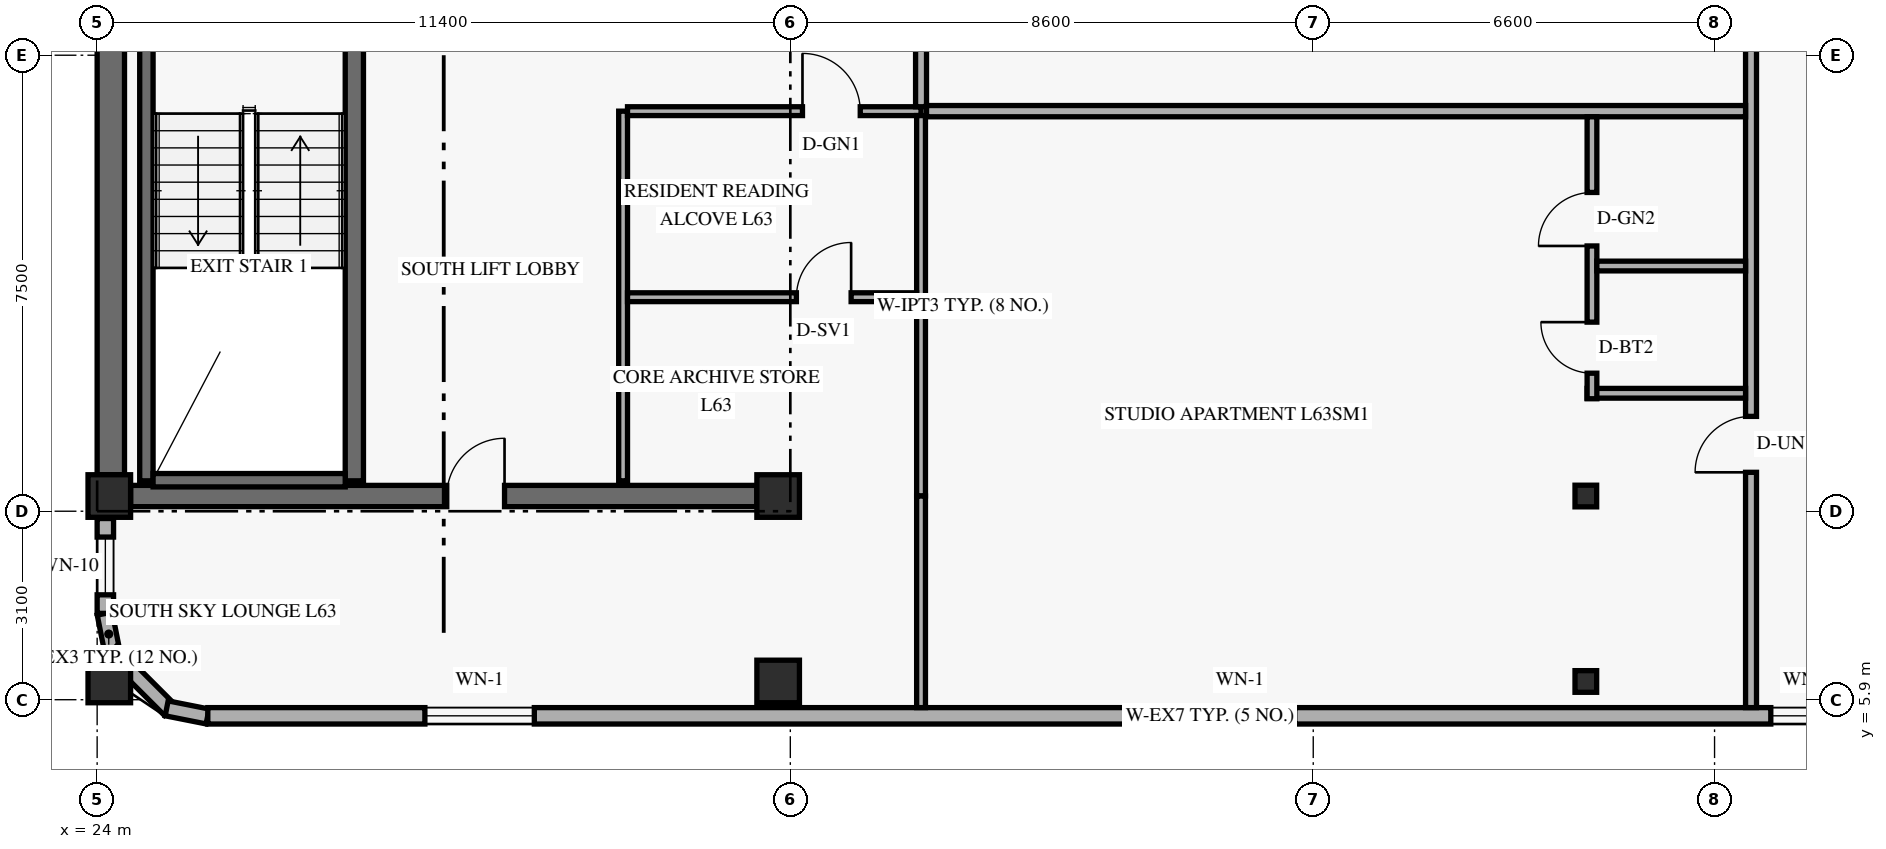
"""IFC4 building model, lengths in metres.
Left out: names, types, materials, properties, quantities, classifications, styles, units other than length and angle.
Written with IfcOpenShell. Run it as: python <this file> out.ifc"""

import sys

from ifc_helpers import new_model, si_unit, direction, frame, frame_2d, origin, origin_2d, place, context, subcontext, project, spatial, rectangle, hollow_rectangle, extrude, element, fill, save


model = new_model("IFC4")
c1 = context("Model", 3, precision=1e-05, world=origin(), true_north=direction((0.0, 1.0)))
c2 = subcontext(c1, "Body", "Model", "MODEL_VIEW")
j1 = project(units=[si_unit("LENGTHUNIT", "METRE"), si_unit("PLANEANGLEUNIT", "RADIAN")], contexts=[c1])
p1 = place(None, origin())
s1 = spatial("IfcSite", under=j1, at=p1, CompositionType="ELEMENT")
p2 = place(p1, origin())
s2 = spatial("IfcBuilding", under=s1, at=p2, CompositionType="ELEMENT")
p3 = place(p2, frame((0.0, 0.0, 242.4)))
s3 = spatial("IfcBuildingStorey", under=s2, at=p3, CompositionType="ELEMENT", Elevation=242.4)
p4 = place(p3, frame((24.225, 9.6, 0.0), z_axis=(0.0, 0.0, 1.0), x_axis=(0.0, 1.0, 0.0)))
e1 = element("IfcWall", 1, at=p4, inside=s3, PredefinedType="SHEAR", context=c2, shape_type="SweptSolid", body=[
    extrude(rectangle(XDim=7.6, YDim=0.45, at=frame_2d((3.8, 0.0))), origin(), (0.0, 0.0, 1.0), 2.821),
])
p5 = place(p3, frame((24.55, 9.25, 0.0), z_axis=(0.0, 0.0, 1.0), x_axis=(1.0, 0.0, 0.0)))
e2 = element("IfcWall", 2, at=p5, inside=s3, PredefinedType="SHEAR", context=c2, shape_type="SweptSolid", body=[
    extrude(rectangle(XDim=10.3, YDim=0.35, at=frame_2d((5.15, 0.0))), origin(), (0.0, 0.0, 1.0), 3.36),
])
p6 = place(p5, frame((5.2, 0.0, 0.0)))
e3 = element("IfcOpeningElement", 3, at=p6, cuts=e2, PredefinedType="OPENING", context=c2, shape_type="SweptSolid", body=[
    extrude(rectangle(XDim=0.95, YDim=2.15, at=frame_2d((0.475, 1.075))), frame((0.0, 0.185, 0.0), z_axis=(0.0, -1.0, 0.0), x_axis=(1.0, 0.0, 0.0)), (0.0, 0.0, 1.0), 0.37),
])
p7 = place(p3, frame((24.81, 9.5, 0.0), z_axis=(0.0, 0.0, 1.0), x_axis=(0.0, 1.0, 0.0)))
e4 = element("IfcWall", 4, at=p7, inside=s3, PredefinedType="SHEAR", context=c2, shape_type="SweptSolid", body=[
    extrude(rectangle(XDim=7.76, YDim=0.22, at=frame_2d((3.88, 0.0))), origin(), (0.0, 0.0, 1.0), 3.36),
])
p8 = place(p3, frame((28.23, 9.5, 0.0), z_axis=(0.0, 0.0, 1.0), x_axis=(0.0, 1.0, 0.0)))
e5 = element("IfcWall", 5, at=p8, inside=s3, PredefinedType="SHEAR", context=c2, shape_type="SweptSolid", body=[
    extrude(rectangle(XDim=7.76, YDim=0.3, at=frame_2d((3.88, 0.0))), origin(), (0.0, 0.0, 1.0), 3.36),
])
p9 = place(p3, frame((24.92, 9.51, 0.0), z_axis=(0.0, 0.0, 1.0), x_axis=(1.0, 0.0, 0.0)))
e6 = element("IfcWall", 6, at=p9, inside=s3, PredefinedType="SHEAR", context=c2, shape_type="SweptSolid", body=[
    extrude(rectangle(XDim=3.16, YDim=0.22, at=frame_2d((1.58, 0.0))), origin(), (0.0, 0.0, 1.0), 3.36),
])
for number, where, z_axis, x_axis in (
    (7, (24.2, 6.2, 0.0), (0.0, 0.0, 1.0), (1.0, 0.0, 0.0)),
    (8, (24.2, 9.25, 0.0), (0.0, 0.0, 1.0), (1.0, 0.0, 0.0)),
    (9, (35.2, 6.2, 0.0), (0.0, 0.0, 1.0), (1.0, 0.0, 0.0)),
    (10, (35.2, 9.25, 0.0), (0.0, 0.0, 1.0), (1.0, 0.0, 0.0)),
):
    element("IfcColumn", number, at=place(p3, frame(where, z_axis=z_axis, x_axis=x_axis)), inside=s3, PredefinedType="COLUMN", context=c2, shape_type="SweptSolid", body=[
        extrude(rectangle(XDim=0.7, YDim=0.7, at=origin_2d()), origin(), (0.0, 0.0, 1.0), 3.6),
    ])
for number, where, z_axis, x_axis in (
    (11, (48.42, 6.2, 0.0), (0.035, 0.0, 0.999), (0.0, 1.0, 0.0)),
    (12, (48.42, 9.25, 0.0), (0.035, 0.0, 0.999), (0.0, 1.0, 0.0)),
):
    element("IfcColumn", number, at=place(p3, frame(where, z_axis=z_axis, x_axis=x_axis)), inside=s3, PredefinedType="COLUMN", context=c2, shape_type="SweptSolid", body=[
        extrude(hollow_rectangle(XDim=0.356, YDim=0.356, WallThickness=0.016, at=origin_2d()), origin(), (0.0, 0.0, 1.0), 3.602),
    ])
p10 = place(p3, frame((24.124, 7.316, 0.0), z_axis=(0.0, 0.0, 1.0), x_axis=(0.194952956674, -0.980812594069, 0.0)))
e13 = element("IfcWall", 13, at=p10, inside=s3, PredefinedType="SOLIDWALL", context=c2, shape_type="SweptSolid", body=[
    extrude(rectangle(XDim=0.686, YDim=0.25, at=frame_2d((0.343, 0.0))), origin(), (0.0, 0.0, 1.0), 2.803),
])
p11 = place(p3, frame((24.231, 6.694, 0.0), z_axis=(0.0, 0.0, 1.0), x_axis=(0.707106781187, -0.707106781187, 0.0)))
e14 = element("IfcWall", 14, at=p11, inside=s3, PredefinedType="SOLIDWALL", context=c2, shape_type="SweptSolid", body=[
    extrude(rectangle(XDim=1.362, YDim=0.25, at=frame_2d((0.681, 0.0))), origin(), (0.0, 0.0, 1.0), 2.803),
])
p12 = place(p3, frame((25.143, 5.758, 0.0), z_axis=(0.0, 0.0, 1.0), x_axis=(0.980812594069, -0.194952956674, 0.0)))
e15 = element("IfcWall", 15, at=p12, inside=s3, PredefinedType="SOLIDWALL", context=c2, shape_type="SweptSolid", body=[
    extrude(rectangle(XDim=0.686, YDim=0.25, at=frame_2d((0.343, 0.0))), origin(), (0.0, 0.0, 1.0), 3.36),
])
p13 = place(p3, frame((25.82, 5.635, 0.0), z_axis=(0.0, 0.0, 1.0), x_axis=(1.0, 0.0, 0.0)))
e16 = element("IfcWall", 16, at=p13, inside=s3, PredefinedType="SOLIDWALL", context=c2, shape_type="SweptSolid", body=[
    extrude(rectangle(XDim=32.96, YDim=0.27, at=frame_2d((16.48, 0.0))), origin(), (0.0, 0.0, 1.0), 3.36),
])
p14 = place(p13, frame((3.57, 0.0, 0.85)))
e17 = element("IfcOpeningElement", 17, at=p14, cuts=e16, PredefinedType="OPENING", context=c2, shape_type="SweptSolid", body=[
    extrude(rectangle(XDim=1.8, YDim=1.6, at=frame_2d((0.9, 0.8))), frame((0.0, 0.145, 0.0), z_axis=(0.0, -1.0, 0.0), x_axis=(1.0, 0.0, 0.0)), (0.0, 0.0, 1.0), 0.29),
])
p15 = place(p13, frame((16.076, 0.0, 0.85)))
e18 = element("IfcOpeningElement", 18, at=p15, cuts=e16, PredefinedType="OPENING", context=c2, shape_type="SweptSolid", body=[
    extrude(rectangle(XDim=1.8, YDim=1.6, at=frame_2d((0.9, 0.8))), frame((0.0, 0.145, 0.0), z_axis=(0.0, -1.0, 0.0), x_axis=(1.0, 0.0, 0.0)), (0.0, 0.0, 1.0), 0.29),
])
p16 = place(p13, frame((25.705, 0.0, 0.85)))
e19 = element("IfcOpeningElement", 19, at=p16, cuts=e16, PredefinedType="OPENING", context=c2, shape_type="SweptSolid", body=[
    extrude(rectangle(XDim=1.2, YDim=1.5, at=frame_2d((0.6, 0.75))), frame((0.0, 0.145, 0.0), z_axis=(0.0, -1.0, 0.0), x_axis=(1.0, 0.0, 0.0)), (0.0, 0.0, 1.0), 0.29),
])
p17 = place(p13, frame((27.995, 0.0, 0.85)))
e20 = element("IfcOpeningElement", 20, at=p17, cuts=e16, PredefinedType="OPENING", context=c2, shape_type="SweptSolid", body=[
    extrude(rectangle(XDim=1.8, YDim=1.6, at=frame_2d((0.9, 0.8))), frame((0.0, 0.145, 0.0), z_axis=(0.0, -1.0, 0.0), x_axis=(1.0, 0.0, 0.0)), (0.0, 0.0, 1.0), 0.29),
])
p18 = place(p3, frame((24.135, 7.32, 0.0), z_axis=(0.0, 0.0, 1.0), x_axis=(0.0, 1.0, 0.0)))
e21 = element("IfcWall", 21, at=p18, inside=s3, PredefinedType="SOLIDWALL", context=c2, shape_type="SweptSolid", body=[
    extrude(rectangle(XDim=1.56, YDim=0.27, at=frame_2d((0.78, 0.0))), origin(), (0.0, 0.0, 1.0), 2.803),
])
p19 = place(p18, frame((0.305, 0.0, 0.85)))
e22 = element("IfcOpeningElement", 22, at=p19, cuts=e21, PredefinedType="OPENING", context=c2, shape_type="SweptSolid", body=[
    extrude(rectangle(XDim=0.95, YDim=1.5, at=frame_2d((0.475, 0.75))), frame((0.0, 0.145, 0.0), z_axis=(0.0, -1.0, 0.0), x_axis=(1.0, 0.0, 0.0)), (0.0, 0.0, 1.0), 0.29),
])
p20 = place(p3, frame((32.65, 9.5, 0.0), z_axis=(0.0, 0.0, 1.0), x_axis=(0.0, 1.0, 0.0)))
e23 = element("IfcWall", 23, at=p20, inside=s3, PredefinedType="PARTITIONING", context=c2, shape_type="SweptSolid", body=[
    extrude(rectangle(XDim=6.08, YDim=0.145, at=frame_2d((3.04, 0.0))), origin(), (0.0, 0.0, 1.0), 3.36),
])
p21 = place(p3, frame((32.722, 15.58, 0.0), z_axis=(0.0, 0.0, 1.0), x_axis=(1.0, 0.0, 0.0)))
e24 = element("IfcWall", 24, at=p21, inside=s3, PredefinedType="PARTITIONING", context=c2, shape_type="SweptSolid", body=[
    extrude(rectangle(XDim=4.828, YDim=0.145, at=frame_2d((2.414, 0.0))), origin(), (0.0, 0.0, 1.0), 2.803),
])
p22 = place(p21, frame((2.877, 0.0, 0.0)))
e25 = element("IfcOpeningElement", 25, at=p22, cuts=e24, PredefinedType="OPENING", context=c2, shape_type="SweptSolid", body=[
    extrude(rectangle(XDim=0.95, YDim=2.15, at=frame_2d((0.475, 1.075))), frame((0.0, 0.083, 0.0), z_axis=(0.0, -1.0, 0.0), x_axis=(1.0, 0.0, 0.0)), (0.0, 0.0, 1.0), 0.165),
])
p23 = place(p3, frame((37.55, 9.25, 0.0), z_axis=(0.0, 0.0, 1.0), x_axis=(0.0, 1.0, 0.0)))
e26 = element("IfcWall", 26, at=p23, inside=s3, PredefinedType="PARTITIONING", context=c2, shape_type="SweptSolid", body=[
    extrude(rectangle(XDim=6.258, YDim=0.145, at=frame_2d((3.129, 0.0))), origin(), (0.0, 0.0, 1.0), 2.803),
])
p24 = place(p3, frame((32.722, 12.52, 0.0), z_axis=(0.0, 0.0, 1.0), x_axis=(1.0, 0.0, 0.0)))
e27 = element("IfcWall", 27, at=p24, inside=s3, PredefinedType="PARTITIONING", context=c2, shape_type="SweptSolid", body=[
    extrude(rectangle(XDim=4.755, YDim=0.145, at=frame_2d((2.377, 0.0))), origin(), (0.0, 0.0, 1.0), 2.803),
])
p25 = place(p24, frame((2.778, 0.0, 0.0)))
e28 = element("IfcOpeningElement", 28, at=p25, cuts=e27, PredefinedType="OPENING", context=c2, shape_type="SweptSolid", body=[
    extrude(rectangle(XDim=0.9, YDim=2.1, at=frame_2d((0.45, 1.05))), frame((0.0, 0.083, 0.0), z_axis=(0.0, -1.0, 0.0), x_axis=(1.0, 0.0, 0.0)), (0.0, 0.0, 1.0), 0.165),
])
p26 = place(p3, frame((37.55, 15.653, 0.0), z_axis=(0.0, 0.0, 1.0), x_axis=(0.0, 1.0, 0.0)))
e29 = element("IfcWall", 29, at=p26, inside=s3, PredefinedType="STANDARD", context=c2, shape_type="SweptSolid", body=[
    extrude(rectangle(XDim=3.147, YDim=0.18, at=frame_2d((1.574, 0.0))), origin(), (0.0, 0.0, 1.0), 2.803),
])
p27 = place(p3, frame((51.2, 5.77, 0.0), z_axis=(0.0, 0.0, 1.0), x_axis=(0.0, 1.0, 0.0)))
e30 = element("IfcWall", 30, at=p27, inside=s3, PredefinedType="STANDARD", context=c2, shape_type="SweptSolid", body=[
    extrude(rectangle(XDim=13.03, YDim=0.18, at=frame_2d((6.515, 0.0))), origin(), (0.0, 0.0, 1.0), 2.803),
])
p28 = place(p27, frame((3.87, 0.0, 0.0)))
e31 = element("IfcOpeningElement", 31, at=p28, cuts=e30, PredefinedType="OPENING", context=c2, shape_type="SweptSolid", body=[
    extrude(rectangle(XDim=0.92, YDim=2.15, at=frame_2d((0.46, 1.075))), frame((0.0, 0.1, 0.0), z_axis=(0.0, -1.0, 0.0), x_axis=(1.0, 0.0, 0.0)), (0.0, 0.0, 1.0), 0.2),
])
p29 = place(p3, frame((37.55, 5.77, 0.0), z_axis=(0.0, 0.0, 1.0), x_axis=(0.0, 1.0, 0.0)))
e32 = element("IfcWall", 32, at=p29, inside=s3, PredefinedType="PARTITIONING", context=c2, shape_type="SweptSolid", body=[
    extrude(rectangle(XDim=3.48, YDim=0.145, at=frame_2d((1.74, 0.0))), origin(), (0.0, 0.0, 1.0), 2.803),
])
p30 = place(p3, frame((37.64, 15.58, 0.0), z_axis=(0.0, 0.0, 1.0), x_axis=(1.0, 0.0, 0.0)))
e33 = element("IfcWall", 33, at=p30, inside=s3, PredefinedType="PARTITIONING", context=c2, shape_type="SweptSolid", body=[
    extrude(rectangle(XDim=13.47, YDim=0.185, at=frame_2d((6.735, 0.0))), origin(), (0.0, 0.0, 1.0), 2.803),
])
p31 = place(p3, frame((48.504, 10.94, 0.0), z_axis=(0.0, 0.0, 1.0), x_axis=(1.0, 0.0, 0.0)))
e34 = element("IfcWall", 34, at=p31, inside=s3, PredefinedType="PLUMBINGWALL", context=c2, shape_type="SweptSolid", body=[
    extrude(rectangle(XDim=2.606, YDim=0.16, at=frame_2d((1.303, 0.0))), origin(), (0.0, 0.0, 1.0), 2.803),
])
p32 = place(p3, frame((48.584, 10.85, 0.0), z_axis=(0.0, 0.0, 1.0), x_axis=(0.0, 1.0, 0.0)))
e35 = element("IfcWall", 35, at=p32, inside=s3, PredefinedType="PLUMBINGWALL", context=c2, shape_type="SweptSolid", body=[
    extrude(rectangle(XDim=4.637, YDim=0.16, at=frame_2d((2.319, 0.0))), origin(), (0.0, 0.0, 1.0), 2.803),
])
p33 = place(p32, frame((0.42, 0.0, 0.0)))
e36 = element("IfcOpeningElement", 36, at=p33, cuts=e35, PredefinedType="OPENING", context=c2, shape_type="SweptSolid", body=[
    extrude(rectangle(XDim=0.84, YDim=2.12, at=frame_2d((0.42, 1.06))), frame((0.0, 0.09, 0.0), z_axis=(0.0, -1.0, 0.0), x_axis=(1.0, 0.0, 0.0)), (0.0, 0.0, 1.0), 0.18),
])
p34 = place(p32, frame((2.513, 0.0, 0.0)))
e37 = element("IfcOpeningElement", 37, at=p34, cuts=e35, PredefinedType="OPENING", context=c2, shape_type="SweptSolid", body=[
    extrude(rectangle(XDim=0.88, YDim=2.12, at=frame_2d((0.44, 1.06))), frame((0.0, 0.09, 0.0), z_axis=(0.0, -1.0, 0.0), x_axis=(1.0, 0.0, 0.0)), (0.0, 0.0, 1.0), 0.18),
])
p35 = place(p3, frame((48.664, 13.033, 0.0), z_axis=(0.0, 0.0, 1.0), x_axis=(1.0, 0.0, 0.0)))
e38 = element("IfcWall", 38, at=p35, inside=s3, PredefinedType="PLUMBINGWALL", context=c2, shape_type="SweptSolid", body=[
    extrude(rectangle(XDim=2.446, YDim=0.16, at=frame_2d((1.223, 0.0))), origin(), (0.0, 0.0, 1.0), 3.36),
])
p36 = place(p14, origin())
e39 = element("IfcWindow", 39, at=p36, inside=s3, PartitioningType="SINGLE_PANEL", PredefinedType="WINDOW", context=c2, shape_type="SweptSolid", body=[
    extrude(rectangle(XDim=1.8, YDim=1.6, at=frame_2d((0.9, 0.8))), frame((0.0, 0.03, 0.0), z_axis=(0.0, -1.0, 0.0), x_axis=(1.0, 0.0, 0.0)), (0.0, 0.0, 1.0), 0.06),
])
fill(e17, e39)
p37 = place(p15, origin())
e40 = element("IfcWindow", 40, at=p37, inside=s3, PartitioningType="SINGLE_PANEL", PredefinedType="WINDOW", context=c2, shape_type="SweptSolid", body=[
    extrude(rectangle(XDim=1.8, YDim=1.6, at=frame_2d((0.9, 0.8))), frame((0.0, 0.03, 0.0), z_axis=(0.0, -1.0, 0.0), x_axis=(1.0, 0.0, 0.0)), (0.0, 0.0, 1.0), 0.06),
])
fill(e18, e40)
p38 = place(p16, origin())
e41 = element("IfcWindow", 41, at=p38, inside=s3, PartitioningType="SINGLE_PANEL", PredefinedType="WINDOW", context=c2, shape_type="SweptSolid", body=[
    extrude(rectangle(XDim=1.2, YDim=1.5, at=frame_2d((0.6, 0.75))), frame((0.0, 0.03, 0.0), z_axis=(0.0, -1.0, 0.0), x_axis=(1.0, 0.0, 0.0)), (0.0, 0.0, 1.0), 0.06),
])
fill(e19, e41)
p39 = place(p19, origin())
e42 = element("IfcWindow", 42, at=p39, inside=s3, PartitioningType="SINGLE_PANEL", PredefinedType="WINDOW", context=c2, shape_type="SweptSolid", body=[
    extrude(rectangle(XDim=0.95, YDim=1.5, at=frame_2d((0.475, 0.75))), frame((0.0, 0.03, 0.0), z_axis=(0.0, -1.0, 0.0), x_axis=(1.0, 0.0, 0.0)), (0.0, 0.0, 1.0), 0.06),
])
fill(e22, e42)
p40 = place(p22, origin())
e43 = element("IfcDoor", 43, at=p40, inside=s3, OperationType="SINGLE_SWING_LEFT", PredefinedType="DOOR", context=c2, shape_type="SweptSolid", body=[
    extrude(rectangle(XDim=0.95, YDim=2.15, at=frame_2d((0.475, 1.075))), frame((0.0, 0.025, 0.0), z_axis=(0.0, -1.0, 0.0), x_axis=(1.0, 0.0, 0.0)), (0.0, 0.0, 1.0), 0.05),
])
fill(e25, e43)
p41 = place(p25, origin())
e44 = element("IfcDoor", 44, at=p41, inside=s3, OperationType="SINGLE_SWING_RIGHT", PredefinedType="DOOR", context=c2, shape_type="SweptSolid", body=[
    extrude(rectangle(XDim=0.9, YDim=2.1, at=frame_2d((0.45, 1.05))), frame((0.0, 0.025, 0.0), z_axis=(0.0, -1.0, 0.0), x_axis=(1.0, 0.0, 0.0)), (0.0, 0.0, 1.0), 0.05),
])
fill(e28, e44)
p42 = place(p6, frame((0.95, 0.0, 0.0), z_axis=(0.0, 0.0, 1.0), x_axis=(-1.0, 0.0, 0.0)))
e45 = element("IfcDoor", 45, at=p42, inside=s3, OperationType="SINGLE_SWING_LEFT", PredefinedType="DOOR", context=c2, shape_type="SweptSolid", body=[
    extrude(rectangle(XDim=0.95, YDim=2.15, at=frame_2d((0.475, 1.075))), frame((0.0, 0.025, 0.0), z_axis=(0.0, -1.0, 0.0), x_axis=(1.0, 0.0, 0.0)), (0.0, 0.0, 1.0), 0.05),
])
fill(e3, e45)
p43 = place(p28, origin())
e46 = element("IfcDoor", 46, at=p43, inside=s3, OperationType="SINGLE_SWING_LEFT", PredefinedType="DOOR", context=c2, shape_type="SweptSolid", body=[
    extrude(rectangle(XDim=0.92, YDim=2.15, at=frame_2d((0.46, 1.075))), frame((0.0, 0.025, 0.0), z_axis=(0.0, -1.0, 0.0), x_axis=(1.0, 0.0, 0.0)), (0.0, 0.0, 1.0), 0.05),
])
fill(e31, e46)
p44 = place(p33, origin())
e47 = element("IfcDoor", 47, at=p44, inside=s3, OperationType="SINGLE_SWING_RIGHT", PredefinedType="DOOR", context=c2, shape_type="SweptSolid", body=[
    extrude(rectangle(XDim=0.84, YDim=2.12, at=frame_2d((0.42, 1.06))), frame((0.0, 0.025, 0.0), z_axis=(0.0, -1.0, 0.0), x_axis=(1.0, 0.0, 0.0)), (0.0, 0.0, 1.0), 0.05),
])
fill(e36, e47)
p45 = place(p34, origin())
e48 = element("IfcDoor", 48, at=p45, inside=s3, OperationType="SINGLE_SWING_LEFT", PredefinedType="DOOR", context=c2, shape_type="SweptSolid", body=[
    extrude(rectangle(XDim=0.88, YDim=2.12, at=frame_2d((0.44, 1.06))), frame((0.0, 0.025, 0.0), z_axis=(0.0, -1.0, 0.0), x_axis=(1.0, 0.0, 0.0)), (0.0, 0.0, 1.0), 0.05),
])
fill(e37, e48)
save(model, sys.argv[1])
